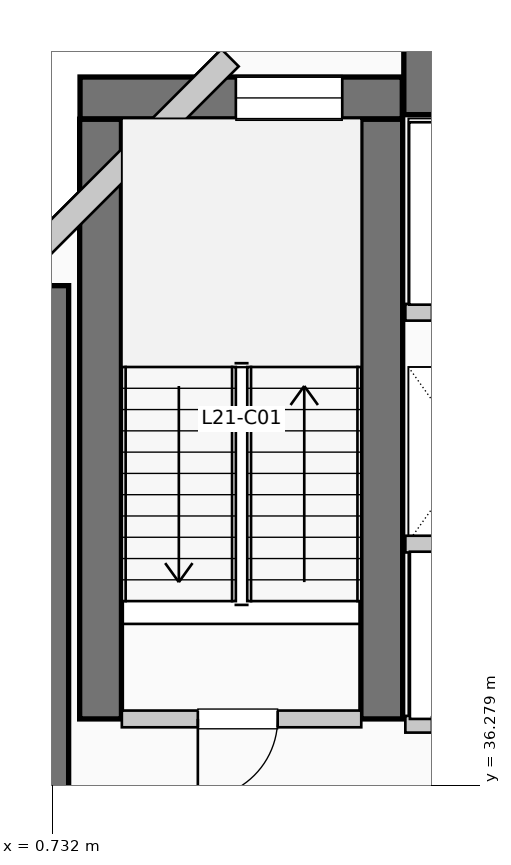
"""IFC4 building model, lengths in metres.
Left out: names, types, materials, properties, quantities, classifications, styles, units other than length and angle.
Written with IfcOpenShell. Run it as: python <this file> out.ifc"""

import sys

from ifc_helpers import new_model, si_unit, direction, frame, frame_2d, origin, place, context, subcontext, project, spatial, rectangle, extrude, element, fill, save


model = new_model("IFC4")
c1 = context("Model", 3, precision=1e-05, world=origin(), true_north=direction((0.0, 1.0)))
c2 = subcontext(c1, "Body", "Model", "MODEL_VIEW")
j1 = project(units=[si_unit("LENGTHUNIT", "METRE"), si_unit("PLANEANGLEUNIT", "RADIAN")], contexts=[c1])
p1 = place(None, origin())
s1 = spatial("IfcSite", under=j1, at=p1, CompositionType="ELEMENT")
p2 = place(p1, origin())
s2 = spatial("IfcBuilding", under=s1, at=p2, CompositionType="ELEMENT")
p3 = place(p2, frame((0.0, 0.0, 89.76)))
s3 = spatial("IfcBuildingStorey", under=s2, at=p3, CompositionType="ELEMENT", Elevation=89.76)
p4 = place(p3, frame((5.36, 45.55, 0.0), z_axis=(0.0, 0.0, 1.0), x_axis=(1.0, 0.0, 0.0)))
e1 = element("IfcWall", 1, at=p4, inside=s3, PredefinedType="SHEAR", context=c2, shape_type="SweptSolid", body=[
    extrude(rectangle(XDim=13.98, YDim=0.9, at=frame_2d((6.99, 0.0))), origin(), (0.0, 0.0, 1.0), 3.96),
])
p5 = place(p3, frame((0.5, 34.95, 0.0), z_axis=(0.0, 0.0, 1.0), x_axis=(0.0, 1.0, 0.0)))
e2 = element("IfcWall", 2, at=p5, inside=s3, PredefinedType="SHEAR", context=c2, shape_type="SweptSolid", body=[
    extrude(rectangle(XDim=7.9, YDim=0.9, at=frame_2d((3.95, 0.0))), origin(), (0.0, 0.0, 1.0), 3.96),
])
for number, where, z_axis, x_axis in (
    (3, (1.37, 37.15, 0.0), (0.0, 0.0, 1.0), (0.0, 1.0, 0.0)),
    (4, (5.07, 37.15, 0.0), (0.0, 0.0, 1.0), (0.0, 1.0, 0.0)),
):
    element("IfcWall", number, at=place(p3, frame(where, z_axis=z_axis, x_axis=x_axis)), inside=s3, PredefinedType="SHEAR", context=c2, shape_type="SweptSolid", body=[
        extrude(rectangle(XDim=7.89, YDim=0.55, at=frame_2d((3.945, 0.0))), origin(), (0.0, 0.0, 1.0), 3.96),
    ])
p6 = place(p3, frame((1.1, 45.32, 0.0), z_axis=(0.0, 0.0, 1.0), x_axis=(1.0, 0.0, 0.0)))
e5 = element("IfcWall", 5, at=p6, inside=s3, PredefinedType="SHEAR", context=c2, shape_type="SweptSolid", body=[
    extrude(rectangle(XDim=4.24, YDim=0.55, at=frame_2d((2.12, 0.0))), origin(), (0.0, 0.0, 1.0), 3.96),
])
p7 = place(p6, frame((2.05, 0.0, 1.05)))
e6 = element("IfcOpeningElement", 6, at=p7, cuts=e5, PredefinedType="OPENING", context=c2, shape_type="SweptSolid", body=[
    extrude(rectangle(XDim=1.4, YDim=1.8, at=frame_2d((0.7, 0.9))), frame((0.0, 0.285, 0.0), z_axis=(0.0, -1.0, 0.0), x_axis=(1.0, 0.0, 0.0)), (0.0, 0.0, 1.0), 0.57),
])
p8 = place(p3, frame((3.074, 45.848, 0.0), z_axis=(0.0, 0.0, 1.0), x_axis=(-0.707106781187, -0.707106781187, 0.0)))
e7 = element("IfcWall", 7, at=p8, inside=s3, PredefinedType="SOLIDWALL", context=c2, shape_type="SweptSolid", body=[
    extrude(rectangle(XDim=4.133, YDim=0.32, at=frame_2d((2.066, 0.0))), origin(), (0.0, 0.0, 1.0), 3.61),
])
p9 = place(p3, frame((1.65, 37.15, 0.0), z_axis=(0.0, 0.0, 1.0), x_axis=(1.0, 0.0, 0.0)))
e8 = element("IfcWall", 8, at=p9, inside=s3, PredefinedType="PARTITIONING", context=c2, shape_type="SweptSolid", body=[
    extrude(rectangle(XDim=3.15, YDim=0.22, at=frame_2d((1.575, 0.0))), origin(), (0.0, 0.0, 1.0), 3.61),
])
p10 = place(p9, frame((2.05, 0.0, 0.0), z_axis=(0.0, 0.0, 1.0), x_axis=(-1.0, 0.0, 0.0)))
e9 = element("IfcOpeningElement", 9, at=p10, cuts=e8, PredefinedType="OPENING", context=c2, shape_type="SweptSolid", body=[
    extrude(rectangle(XDim=1.05, YDim=2.15, at=frame_2d((0.525, 1.075))), frame((0.0, 0.12, 0.0), z_axis=(0.0, -1.0, 0.0), x_axis=(1.0, 0.0, 0.0)), (0.0, 0.0, 1.0), 0.24),
])
p11 = place(p3, frame((5.38, 37.08, 0.0), z_axis=(0.0, 0.0, 1.0), x_axis=(1.0, 0.0, 0.0)))
e10 = element("IfcWall", 10, at=p11, inside=s3, PredefinedType="PARTITIONING", context=c2, shape_type="SweptSolid", body=[
    extrude(rectangle(XDim=3.46, YDim=0.22, at=frame_2d((1.73, 0.0))), origin(), (0.0, 0.0, 1.0), 3.61),
])
p12 = place(p11, frame((1.55, 0.0, 0.0), z_axis=(0.0, 0.0, 1.0), x_axis=(-1.0, 0.0, 0.0)))
e11 = element("IfcOpeningElement", 11, at=p12, cuts=e10, PredefinedType="OPENING", context=c2, shape_type="SweptSolid", body=[
    extrude(rectangle(XDim=1.2, YDim=2.2, at=frame_2d((0.6, 1.1))), frame((0.0, 0.12, 0.0), z_axis=(0.0, -1.0, 0.0), x_axis=(1.0, 0.0, 0.0)), (0.0, 0.0, 1.0), 0.24),
])
p13 = place(p11, frame((3.22, 0.0, 0.0), z_axis=(0.0, 0.0, 1.0), x_axis=(-1.0, 0.0, 0.0)))
e12 = element("IfcOpeningElement", 12, at=p13, cuts=e10, PredefinedType="OPENING", context=c2, shape_type="SweptSolid", body=[
    extrude(rectangle(XDim=1.2, YDim=2.2, at=frame_2d((0.6, 1.1))), frame((0.0, 0.12, 0.0), z_axis=(0.0, -1.0, 0.0), x_axis=(1.0, 0.0, 0.0)), (0.0, 0.0, 1.0), 0.24),
])
p14 = place(p3, frame((5.38, 39.45, 0.0), z_axis=(0.0, 0.0, 1.0), x_axis=(1.0, 0.0, 0.0)))
e13 = element("IfcWall", 13, at=p14, inside=s3, PredefinedType="PARTITIONING", context=c2, shape_type="SweptSolid", body=[
    extrude(rectangle(XDim=3.46, YDim=0.22, at=frame_2d((1.73, 0.0))), origin(), (0.0, 0.0, 1.0), 3.61),
])
p15 = place(p3, frame((5.38, 42.5, 0.0), z_axis=(0.0, 0.0, 1.0), x_axis=(1.0, 0.0, 0.0)))
e14 = element("IfcWall", 14, at=p15, inside=s3, PredefinedType="PARTITIONING", context=c2, shape_type="SweptSolid", body=[
    extrude(rectangle(XDim=3.77, YDim=0.22, at=frame_2d((1.885, 0.0))), origin(), (0.0, 0.0, 1.0), 3.61),
])
p16 = place(p15, frame((1.75, 0.0, 0.0), z_axis=(0.0, 0.0, 1.0), x_axis=(-1.0, 0.0, 0.0)))
e15 = element("IfcOpeningElement", 15, at=p16, cuts=e14, PredefinedType="OPENING", context=c2, shape_type="SweptSolid", body=[
    extrude(rectangle(XDim=1.4, YDim=2.2, at=frame_2d((0.7, 1.1))), frame((0.0, 0.12, 0.0), z_axis=(0.0, -1.0, 0.0), x_axis=(1.0, 0.0, 0.0)), (0.0, 0.0, 1.0), 0.24),
])
p17 = place(p15, frame((3.53, 0.0, 0.0), z_axis=(0.0, 0.0, 1.0), x_axis=(-1.0, 0.0, 0.0)))
e16 = element("IfcOpeningElement", 16, at=p17, cuts=e14, PredefinedType="OPENING", context=c2, shape_type="SweptSolid", body=[
    extrude(rectangle(XDim=1.4, YDim=2.2, at=frame_2d((0.7, 1.1))), frame((0.0, 0.12, 0.0), z_axis=(0.0, -1.0, 0.0), x_axis=(1.0, 0.0, 0.0)), (0.0, 0.0, 1.0), 0.24),
])
p18 = place(p7, origin())
e17 = element("IfcWindow", 17, at=p18, inside=s3, PartitioningType="SINGLE_PANEL", PredefinedType="WINDOW", context=c2, shape_type="SweptSolid", body=[
    extrude(rectangle(XDim=1.4, YDim=1.8, at=frame_2d((0.7, 0.9))), frame((0.0, 0.03, 0.0), z_axis=(0.0, -1.0, 0.0), x_axis=(1.0, 0.0, 0.0)), (0.0, 0.0, 1.0), 0.06),
])
fill(e6, e17)
p19 = place(p10, origin())
e18 = element("IfcDoor", 18, at=p19, inside=s3, OperationType="SINGLE_SWING_LEFT", PredefinedType="DOOR", context=c2, shape_type="SweptSolid", body=[
    extrude(rectangle(XDim=1.05, YDim=2.15, at=frame_2d((0.525, 1.075))), frame((0.0, 0.025, 0.0), z_axis=(0.0, -1.0, 0.0), x_axis=(1.0, 0.0, 0.0)), (0.0, 0.0, 1.0), 0.05),
])
fill(e9, e18)
save(model, sys.argv[1])
